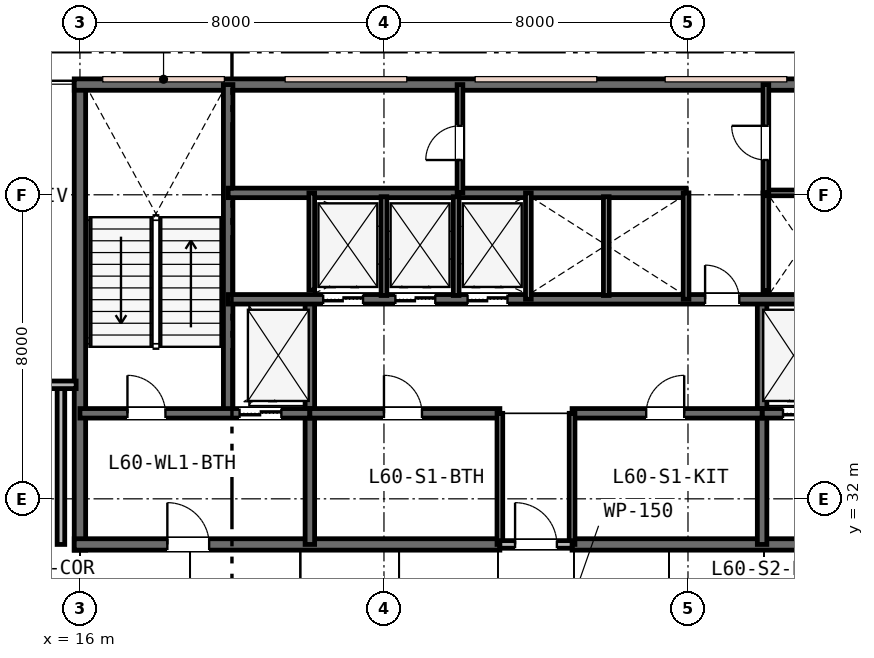
"""IFC4 building model, lengths in metres.
Left out: names, types, materials, properties, quantities, classifications, styles, units other than length and angle.
Written with IfcOpenShell. Run it as: python <this file> out.ifc"""

import sys

from ifc_helpers import new_model, si_unit, direction, frame, frame_2d, origin, place, context, subcontext, project, spatial, rectangle, extrude, element, fill, save


model = new_model("IFC4")
c1 = context("Model", 3, precision=1e-05, world=origin(), true_north=direction((0.0, 1.0)))
c2 = subcontext(c1, "Body", "Model", "MODEL_VIEW")
j1 = project(units=[si_unit("LENGTHUNIT", "METRE"), si_unit("PLANEANGLEUNIT", "RADIAN")], contexts=[c1])
p1 = place(None, origin())
s1 = spatial("IfcSite", under=j1, at=p1, CompositionType="ELEMENT")
p2 = place(p1, origin())
s2 = spatial("IfcBuilding", under=s1, at=p2, CompositionType="ELEMENT")
p3 = place(p2, frame((0.0, 0.0, 233.6)))
s3 = spatial("IfcBuildingStorey", under=s2, at=p3, CompositionType="ELEMENT", Elevation=233.6)
p4 = place(p3, frame((16.0, 30.65, 0.0), z_axis=(0.0, 0.0, 1.0), x_axis=(0.0, 1.0, 0.0)))
e1 = element("IfcWall", 1, at=p4, inside=s3, PredefinedType="SHEAR", context=c2, shape_type="SweptSolid", body=[
    extrude(rectangle(XDim=12.3, YDim=0.3, at=frame_2d((6.15, 0.0))), origin(), (0.0, 0.0, 1.0), 3.8),
])
p5 = place(p3, frame((15.85, 42.9, 0.0), z_axis=(0.0, 0.0, 1.0), x_axis=(1.0, 0.0, 0.0)))
e2 = element("IfcWall", 2, at=p5, inside=s3, PredefinedType="SHEAR", context=c2, shape_type="SweptSolid", body=[
    extrude(rectangle(XDim=24.3, YDim=0.3, at=frame_2d((12.15, 0.0))), origin(), (0.0, 0.0, 1.0), 3.8),
])
p6 = place(p3, frame((15.85, 30.8, 0.0), z_axis=(0.0, 0.0, 1.0), x_axis=(1.0, 0.0, 0.0)))
e3 = element("IfcWall", 3, at=p6, inside=s3, PredefinedType="SHEAR", context=c2, shape_type="SweptSolid", body=[
    extrude(rectangle(XDim=11.2, YDim=0.3, at=frame_2d((5.6, 0.0))), origin(), (0.0, 0.0, 1.0), 3.8),
])
p7 = place(p6, frame((2.45, 0.0, 0.0)))
e4 = element("IfcOpeningElement", 4, at=p7, cuts=e3, PredefinedType="OPENING", context=c2, shape_type="SweptSolid", body=[
    extrude(rectangle(XDim=1.1, YDim=2.15, at=frame_2d((0.55, 1.075))), frame((0.0, 0.16, 0.0), z_axis=(0.0, -1.0, 0.0), x_axis=(1.0, 0.0, 0.0)), (0.0, 0.0, 1.0), 0.32),
])
p8 = place(p3, frame((28.95, 30.8, 0.0), z_axis=(0.0, 0.0, 1.0), x_axis=(1.0, 0.0, 0.0)))
e5 = element("IfcWall", 5, at=p8, inside=s3, PredefinedType="SHEAR", context=c2, shape_type="SweptSolid", body=[
    extrude(rectangle(XDim=11.2, YDim=0.3, at=frame_2d((5.6, 0.0))), origin(), (0.0, 0.0, 1.0), 3.8),
])
p9 = place(p8, frame((7.65, 0.0, 0.0)))
e6 = element("IfcOpeningElement", 6, at=p9, cuts=e5, PredefinedType="OPENING", context=c2, shape_type="SweptSolid", body=[
    extrude(rectangle(XDim=1.1, YDim=2.15, at=frame_2d((0.55, 1.075))), frame((0.0, 0.16, 0.0), z_axis=(0.0, -1.0, 0.0), x_axis=(1.0, 0.0, 0.0)), (0.0, 0.0, 1.0), 0.32),
])
p10 = place(p3, frame((19.9, 34.25, 0.0), z_axis=(0.0, 0.0, 1.0), x_axis=(0.0, 1.0, 0.0)))
e7 = element("IfcWall", 7, at=p10, inside=s3, PredefinedType="SHEAR", context=c2, shape_type="SweptSolid", body=[
    extrude(rectangle(XDim=8.65, YDim=0.25, at=frame_2d((4.325, 0.0))), origin(), (0.0, 0.0, 1.0), 3.8),
])
for number, where, z_axis, x_axis in (
    (8, (22.05, 30.8, 0.0), (0.0, 0.0, 1.0), (0.0, 1.0, 0.0)),
    (9, (33.95, 30.8, 0.0), (0.0, 0.0, 1.0), (0.0, 1.0, 0.0)),
):
    element("IfcWall", number, at=place(p3, frame(where, z_axis=z_axis, x_axis=x_axis)), inside=s3, PredefinedType="SHEAR", context=c2, shape_type="SweptSolid", body=[
        extrude(rectangle(XDim=6.45, YDim=0.25, at=frame_2d((3.225, 0.0))), origin(), (0.0, 0.0, 1.0), 3.8),
    ])
p11 = place(p3, frame((16.0, 34.25, 0.0), z_axis=(0.0, 0.0, 1.0), x_axis=(1.0, 0.0, 0.0)))
e10 = element("IfcWall", 10, at=p11, inside=s3, PredefinedType="SHEAR", context=c2, shape_type="SweptSolid", body=[
    extrude(rectangle(XDim=6.05, YDim=0.25, at=frame_2d((3.025, 0.0))), origin(), (0.0, 0.0, 1.0), 3.8),
])
p12 = place(p11, frame((1.25, 0.0, 0.0)))
e11 = element("IfcOpeningElement", 11, at=p12, cuts=e10, PredefinedType="OPENING", context=c2, shape_type="SweptSolid", body=[
    extrude(rectangle(XDim=1.0, YDim=2.15, at=frame_2d((0.5, 1.075))), frame((0.0, 0.135, 0.0), z_axis=(0.0, -1.0, 0.0), x_axis=(1.0, 0.0, 0.0)), (0.0, 0.0, 1.0), 0.27),
])
p13 = place(p11, frame((4.2, 0.0, 0.0)))
e12 = element("IfcOpeningElement", 12, at=p13, cuts=e10, PredefinedType="OPENING", context=c2, shape_type="SweptSolid", body=[
    extrude(rectangle(XDim=1.1, YDim=2.15, at=frame_2d((0.55, 1.075))), frame((0.0, 0.135, 0.0), z_axis=(0.0, -1.0, 0.0), x_axis=(1.0, 0.0, 0.0)), (0.0, 0.0, 1.0), 0.27),
])
p14 = place(p3, frame((33.95, 34.25, 0.0), z_axis=(0.0, 0.0, 1.0), x_axis=(1.0, 0.0, 0.0)))
e13 = element("IfcWall", 13, at=p14, inside=s3, PredefinedType="SHEAR", context=c2, shape_type="SweptSolid", body=[
    extrude(rectangle(XDim=6.05, YDim=0.25, at=frame_2d((3.025, 0.0))), origin(), (0.0, 0.0, 1.0), 3.8),
])
p15 = place(p14, frame((3.7, 0.0, 0.0)))
e14 = element("IfcOpeningElement", 14, at=p15, cuts=e13, PredefinedType="OPENING", context=c2, shape_type="SweptSolid", body=[
    extrude(rectangle(XDim=1.0, YDim=2.15, at=frame_2d((0.5, 1.075))), frame((0.0, 0.135, 0.0), z_axis=(0.0, -1.0, 0.0), x_axis=(1.0, 0.0, 0.0)), (0.0, 0.0, 1.0), 0.27),
])
p16 = place(p14, frame((0.55, 0.0, 0.0)))
e15 = element("IfcOpeningElement", 15, at=p16, cuts=e13, PredefinedType="OPENING", context=c2, shape_type="SweptSolid", body=[
    extrude(rectangle(XDim=1.1, YDim=2.15, at=frame_2d((0.55, 1.075))), frame((0.0, 0.135, 0.0), z_axis=(0.0, -1.0, 0.0), x_axis=(1.0, 0.0, 0.0)), (0.0, 0.0, 1.0), 0.27),
])
p17 = place(p3, frame((22.05, 34.25, 0.0), z_axis=(0.0, 0.0, 1.0), x_axis=(1.0, 0.0, 0.0)))
e16 = element("IfcWall", 16, at=p17, inside=s3, PredefinedType="SHEAR", context=c2, shape_type="SweptSolid", body=[
    extrude(rectangle(XDim=5.0, YDim=0.25, at=frame_2d((2.5, 0.0))), origin(), (0.0, 0.0, 1.0), 3.8),
])
p18 = place(p17, frame((1.95, 0.0, 0.0)))
e17 = element("IfcOpeningElement", 17, at=p18, cuts=e16, PredefinedType="OPENING", context=c2, shape_type="SweptSolid", body=[
    extrude(rectangle(XDim=1.0, YDim=2.15, at=frame_2d((0.5, 1.075))), frame((0.0, 0.135, 0.0), z_axis=(0.0, -1.0, 0.0), x_axis=(1.0, 0.0, 0.0)), (0.0, 0.0, 1.0), 0.27),
])
p19 = place(p3, frame((28.95, 34.25, 0.0), z_axis=(0.0, 0.0, 1.0), x_axis=(1.0, 0.0, 0.0)))
e18 = element("IfcWall", 18, at=p19, inside=s3, PredefinedType="SHEAR", context=c2, shape_type="SweptSolid", body=[
    extrude(rectangle(XDim=5.0, YDim=0.25, at=frame_2d((2.5, 0.0))), origin(), (0.0, 0.0, 1.0), 3.8),
])
p20 = place(p19, frame((1.95, 0.0, 0.0)))
e19 = element("IfcOpeningElement", 19, at=p20, cuts=e18, PredefinedType="OPENING", context=c2, shape_type="SweptSolid", body=[
    extrude(rectangle(XDim=1.0, YDim=2.15, at=frame_2d((0.5, 1.075))), frame((0.0, 0.135, 0.0), z_axis=(0.0, -1.0, 0.0), x_axis=(1.0, 0.0, 0.0)), (0.0, 0.0, 1.0), 0.27),
])
p21 = place(p3, frame((19.9, 37.25, 0.0), z_axis=(0.0, 0.0, 1.0), x_axis=(1.0, 0.0, 0.0)))
e20 = element("IfcWall", 20, at=p21, inside=s3, PredefinedType="SHEAR", context=c2, shape_type="SweptSolid", body=[
    extrude(rectangle(XDim=16.2, YDim=0.25, at=frame_2d((8.1, 0.0))), origin(), (0.0, 0.0, 1.0), 3.8),
])
p22 = place(p21, frame((12.55, 0.0, 0.0)))
e21 = element("IfcOpeningElement", 21, at=p22, cuts=e20, PredefinedType="OPENING", context=c2, shape_type="SweptSolid", body=[
    extrude(rectangle(XDim=0.9, YDim=2.15, at=frame_2d((0.45, 1.075))), frame((0.0, 0.135, 0.0), z_axis=(0.0, -1.0, 0.0), x_axis=(1.0, 0.0, 0.0)), (0.0, 0.0, 1.0), 0.27),
])
p23 = place(p21, frame((2.5, 0.0, 0.0)))
e22 = element("IfcOpeningElement", 22, at=p23, cuts=e20, PredefinedType="OPENING", context=c2, shape_type="SweptSolid", body=[
    extrude(rectangle(XDim=1.05, YDim=2.15, at=frame_2d((0.525, 1.075))), frame((0.0, 0.135, 0.0), z_axis=(0.0, -1.0, 0.0), x_axis=(1.0, 0.0, 0.0)), (0.0, 0.0, 1.0), 0.27),
])
p24 = place(p21, frame((4.4, 0.0, 0.0)))
e23 = element("IfcOpeningElement", 23, at=p24, cuts=e20, PredefinedType="OPENING", context=c2, shape_type="SweptSolid", body=[
    extrude(rectangle(XDim=1.05, YDim=2.15, at=frame_2d((0.525, 1.075))), frame((0.0, 0.135, 0.0), z_axis=(0.0, -1.0, 0.0), x_axis=(1.0, 0.0, 0.0)), (0.0, 0.0, 1.0), 0.27),
])
p25 = place(p21, frame((6.3, 0.0, 0.0)))
e24 = element("IfcOpeningElement", 24, at=p25, cuts=e20, PredefinedType="OPENING", context=c2, shape_type="SweptSolid", body=[
    extrude(rectangle(XDim=1.05, YDim=2.15, at=frame_2d((0.525, 1.075))), frame((0.0, 0.135, 0.0), z_axis=(0.0, -1.0, 0.0), x_axis=(1.0, 0.0, 0.0)), (0.0, 0.0, 1.0), 0.27),
])
p26 = place(p3, frame((19.9, 40.05, 0.0), z_axis=(0.0, 0.0, 1.0), x_axis=(1.0, 0.0, 0.0)))
e25 = element("IfcWall", 25, at=p26, inside=s3, PredefinedType="SHEAR", context=c2, shape_type="SweptSolid", body=[
    extrude(rectangle(XDim=12.05, YDim=0.25, at=frame_2d((6.025, 0.0))), origin(), (0.0, 0.0, 1.0), 3.8),
])
for number, where, z_axis, x_axis in (
    (26, (27.05, 30.8, 0.0), (0.0, 0.0, 1.0), (0.0, 1.0, 0.0)),
    (27, (28.95, 30.8, 0.0), (0.0, 0.0, 1.0), (0.0, 1.0, 0.0)),
):
    element("IfcWall", number, at=place(p3, frame(where, z_axis=z_axis, x_axis=x_axis)), inside=s3, PredefinedType="PLUMBINGWALL", context=c2, shape_type="SweptSolid", body=[
        extrude(rectangle(XDim=3.45, YDim=0.15, at=frame_2d((1.725, 0.0))), origin(), (0.0, 0.0, 1.0), 3.22),
    ])
p27 = place(p3, frame((27.05, 30.8, 0.0), z_axis=(0.0, 0.0, 1.0), x_axis=(1.0, 0.0, 0.0)))
e28 = element("IfcWall", 28, at=p27, inside=s3, PredefinedType="PARTITIONING", context=c2, shape_type="SweptSolid", body=[
    extrude(rectangle(XDim=1.9, YDim=0.2, at=frame_2d((0.95, 0.0))), origin(), (0.0, 0.0, 1.0), 3.22),
])
p28 = place(p27, frame((0.4, 0.0, 0.0)))
e29 = element("IfcOpeningElement", 29, at=p28, cuts=e28, PredefinedType="OPENING", context=c2, shape_type="SweptSolid", body=[
    extrude(rectangle(XDim=1.1, YDim=2.15, at=frame_2d((0.55, 1.075))), frame((0.0, 0.11, 0.0), z_axis=(0.0, -1.0, 0.0), x_axis=(1.0, 0.0, 0.0)), (0.0, 0.0, 1.0), 0.22),
])
p29 = place(p3, frame((22.1, 37.49, 0.0), z_axis=(0.0, 0.0, 1.0), x_axis=(0.0, 1.0, 0.0)))
e30 = element("IfcWall", 30, at=p29, inside=s3, PredefinedType="PLUMBINGWALL", context=c2, shape_type="SweptSolid", body=[
    extrude(rectangle(XDim=2.56, YDim=0.15, at=frame_2d((1.28, 0.0))), origin(), (0.0, 0.0, 1.0), 3.53),
])
p30 = place(p3, frame((27.8, 37.25, 0.0), z_axis=(0.0, 0.0, 1.0), x_axis=(0.0, 1.0, 0.0)))
e31 = element("IfcWall", 31, at=p30, inside=s3, PredefinedType="PLUMBINGWALL", context=c2, shape_type="SweptSolid", body=[
    extrude(rectangle(XDim=2.8, YDim=0.15, at=frame_2d((1.4, 0.0))), origin(), (0.0, 0.0, 1.0), 3.53),
])
for number, where, z_axis, x_axis in (
    (32, (24.0, 37.35, 0.0), (0.0, 0.0, 1.0), (0.0, 1.0, 0.0)),
    (33, (25.9, 37.35, 0.0), (0.0, 0.0, 1.0), (0.0, 1.0, 0.0)),
):
    element("IfcWall", number, at=place(p3, frame(where, z_axis=z_axis, x_axis=x_axis)), inside=s3, PredefinedType="PLUMBINGWALL", context=c2, shape_type="SweptSolid", body=[
        extrude(rectangle(XDim=2.6, YDim=0.15, at=frame_2d((1.3, 0.0))), origin(), (0.0, 0.0, 1.0), 3.53),
    ])
p31 = place(p3, frame((31.95, 37.25, 0.0), z_axis=(0.0, 0.0, 1.0), x_axis=(0.0, 1.0, 0.0)))
e34 = element("IfcWall", 34, at=p31, inside=s3, PredefinedType="PLUMBINGWALL", context=c2, shape_type="SweptSolid", body=[
    extrude(rectangle(XDim=2.8, YDim=0.15, at=frame_2d((1.4, 0.0))), origin(), (0.0, 0.0, 1.0), 3.53),
])
p32 = place(p3, frame((29.85, 37.35, 0.0), z_axis=(0.0, 0.0, 1.0), x_axis=(0.0, 1.0, 0.0)))
e35 = element("IfcWall", 35, at=p32, inside=s3, PredefinedType="PLUMBINGWALL", context=c2, shape_type="SweptSolid", body=[
    extrude(rectangle(XDim=2.6, YDim=0.15, at=frame_2d((1.3, 0.0))), origin(), (0.0, 0.0, 1.0), 3.53),
])
p33 = place(p3, frame((34.05, 37.473, 0.0), z_axis=(0.0, 0.0, 1.0), x_axis=(0.0, 1.0, 0.0)))
e36 = element("IfcWall", 36, at=p33, inside=s3, PredefinedType="PLUMBINGWALL", context=c2, shape_type="SweptSolid", body=[
    extrude(rectangle(XDim=2.577, YDim=0.15, at=frame_2d((1.288, 0.0))), origin(), (0.0, 0.0, 1.0), 3.53),
])
p34 = place(p3, frame((34.05, 40.05, 0.0), z_axis=(0.0, 0.0, 1.0), x_axis=(1.0, 0.0, 0.0)))
e37 = element("IfcWall", 37, at=p34, inside=s3, PredefinedType="PARTITIONING", context=c2, shape_type="SweptSolid", body=[
    extrude(rectangle(XDim=2.05, YDim=0.15, at=frame_2d((1.025, 0.0))), origin(), (0.0, 0.0, 1.0), 3.53),
])
p35 = place(p3, frame((34.05, 40.05, 0.0), z_axis=(0.0, 0.0, 1.0), x_axis=(0.0, 1.0, 0.0)))
e38 = element("IfcWall", 38, at=p35, inside=s3, PredefinedType="PARTITIONING", context=c2, shape_type="SweptSolid", body=[
    extrude(rectangle(XDim=2.85, YDim=0.15, at=frame_2d((1.425, 0.0))), origin(), (0.0, 0.0, 1.0), 3.53),
])
p36 = place(p35, frame((0.865, 0.0, 0.0)))
e39 = element("IfcOpeningElement", 39, at=p36, cuts=e38, PredefinedType="OPENING", context=c2, shape_type="SweptSolid", body=[
    extrude(rectangle(XDim=0.9, YDim=2.15, at=frame_2d((0.45, 1.075))), frame((0.0, 0.085, 0.0), z_axis=(0.0, -1.0, 0.0), x_axis=(1.0, 0.0, 0.0)), (0.0, 0.0, 1.0), 0.17),
])
p37 = place(p3, frame((26.0, 40.05, 0.0), z_axis=(0.0, 0.0, 1.0), x_axis=(0.0, 1.0, 0.0)))
e40 = element("IfcWall", 40, at=p37, inside=s3, PredefinedType="PARTITIONING", context=c2, shape_type="SweptSolid", body=[
    extrude(rectangle(XDim=2.85, YDim=0.15, at=frame_2d((1.425, 0.0))), origin(), (0.0, 0.0, 1.0), 3.53),
])
p38 = place(p37, frame((0.865, 0.0, 0.0)))
e41 = element("IfcOpeningElement", 41, at=p38, cuts=e40, PredefinedType="OPENING", context=c2, shape_type="SweptSolid", body=[
    extrude(rectangle(XDim=0.9, YDim=2.15, at=frame_2d((0.45, 1.075))), frame((0.0, 0.085, 0.0), z_axis=(0.0, -1.0, 0.0), x_axis=(1.0, 0.0, 0.0)), (0.0, 0.0, 1.0), 0.17),
])
p39 = place(p3, frame((15.5, 30.8, 0.0), z_axis=(0.0, 0.0, 1.0), x_axis=(0.0, 1.0, 0.0)))
e42 = element("IfcWall", 42, at=p39, inside=s3, PredefinedType="PARTITIONING", context=c2, shape_type="SweptSolid", body=[
    extrude(rectangle(XDim=4.2, YDim=0.2, at=frame_2d((2.1, 0.0))), origin(), (0.0, 0.0, 1.0), 2.92),
])
p40 = place(p3, frame((5.1, 35.0, 0.0), z_axis=(0.0, 0.0, 1.0), x_axis=(1.0, 0.0, 0.0)))
e43 = element("IfcWall", 43, at=p40, inside=s3, PredefinedType="PARTITIONING", context=c2, shape_type="SweptSolid", body=[
    extrude(rectangle(XDim=10.8, YDim=0.2, at=frame_2d((5.4, 0.0))), origin(), (0.0, 0.0, 1.0), 3.24),
])
p41 = place(p40, frame((6.964, 0.0, 0.0)))
e44 = element("IfcOpeningElement", 44, at=p41, cuts=e43, PredefinedType="OPENING", context=c2, shape_type="SweptSolid", body=[
    extrude(rectangle(XDim=0.95, YDim=2.15, at=frame_2d((0.475, 1.075))), frame((0.0, 0.11, 0.0), z_axis=(0.0, -1.0, 0.0), x_axis=(1.0, 0.0, 0.0)), (0.0, 0.0, 1.0), 0.22),
])
p42 = place(p28, origin())
e45 = element("IfcDoor", 45, at=p42, inside=s3, OperationType="SINGLE_SWING_LEFT", PredefinedType="DOOR", context=c2, shape_type="SweptSolid", body=[
    extrude(rectangle(XDim=1.1, YDim=2.15, at=frame_2d((0.55, 1.075))), frame((0.0, 0.025, 0.0), z_axis=(0.0, -1.0, 0.0), x_axis=(1.0, 0.0, 0.0)), (0.0, 0.0, 1.0), 0.05),
])
fill(e29, e45)
p43 = place(p12, origin())
e46 = element("IfcDoor", 46, at=p43, inside=s3, OperationType="SINGLE_SWING_LEFT", PredefinedType="DOOR", context=c2, shape_type="SweptSolid", body=[
    extrude(rectangle(XDim=1.0, YDim=2.15, at=frame_2d((0.5, 1.075))), frame((0.0, 0.025, 0.0), z_axis=(0.0, -1.0, 0.0), x_axis=(1.0, 0.0, 0.0)), (0.0, 0.0, 1.0), 0.05),
])
fill(e11, e46)
p44 = place(p7, origin())
e47 = element("IfcDoor", 47, at=p44, inside=s3, OperationType="SINGLE_SWING_LEFT", PredefinedType="DOOR", context=c2, shape_type="SweptSolid", body=[
    extrude(rectangle(XDim=1.1, YDim=2.15, at=frame_2d((0.55, 1.075))), frame((0.0, 0.025, 0.0), z_axis=(0.0, -1.0, 0.0), x_axis=(1.0, 0.0, 0.0)), (0.0, 0.0, 1.0), 0.05),
])
fill(e4, e47)
p45 = place(p18, origin())
e48 = element("IfcDoor", 48, at=p45, inside=s3, OperationType="SINGLE_SWING_LEFT", PredefinedType="DOOR", context=c2, shape_type="SweptSolid", body=[
    extrude(rectangle(XDim=1.0, YDim=2.15, at=frame_2d((0.5, 1.075))), frame((0.0, 0.025, 0.0), z_axis=(0.0, -1.0, 0.0), x_axis=(1.0, 0.0, 0.0)), (0.0, 0.0, 1.0), 0.05),
])
fill(e17, e48)
p46 = place(p20, origin())
e49 = element("IfcDoor", 49, at=p46, inside=s3, OperationType="SINGLE_SWING_RIGHT", PredefinedType="DOOR", context=c2, shape_type="SweptSolid", body=[
    extrude(rectangle(XDim=1.0, YDim=2.15, at=frame_2d((0.5, 1.075))), frame((0.0, 0.025, 0.0), z_axis=(0.0, -1.0, 0.0), x_axis=(1.0, 0.0, 0.0)), (0.0, 0.0, 1.0), 0.05),
])
fill(e19, e49)
p47 = place(p22, origin())
e50 = element("IfcDoor", 50, at=p47, inside=s3, OperationType="SINGLE_SWING_LEFT", PredefinedType="DOOR", context=c2, shape_type="SweptSolid", body=[
    extrude(rectangle(XDim=0.9, YDim=2.15, at=frame_2d((0.45, 1.075))), frame((0.0, 0.025, 0.0), z_axis=(0.0, -1.0, 0.0), x_axis=(1.0, 0.0, 0.0)), (0.0, 0.0, 1.0), 0.05),
])
fill(e21, e50)
p48 = place(p36, origin())
e51 = element("IfcDoor", 51, at=p48, inside=s3, OperationType="SINGLE_SWING_RIGHT", PredefinedType="DOOR", context=c2, shape_type="SweptSolid", body=[
    extrude(rectangle(XDim=0.9, YDim=2.15, at=frame_2d((0.45, 1.075))), frame((0.0, 0.025, 0.0), z_axis=(0.0, -1.0, 0.0), x_axis=(1.0, 0.0, 0.0)), (0.0, 0.0, 1.0), 0.05),
])
fill(e39, e51)
p49 = place(p38, origin())
e52 = element("IfcDoor", 52, at=p49, inside=s3, OperationType="SINGLE_SWING_LEFT", PredefinedType="DOOR", context=c2, shape_type="SweptSolid", body=[
    extrude(rectangle(XDim=0.9, YDim=2.15, at=frame_2d((0.45, 1.075))), frame((0.0, 0.025, 0.0), z_axis=(0.0, -1.0, 0.0), x_axis=(1.0, 0.0, 0.0)), (0.0, 0.0, 1.0), 0.05),
])
fill(e41, e52)
p50 = place(p13, origin())
e53 = element("IfcDoor", 53, at=p50, inside=s3, OperationType="DOUBLE_DOOR_SLIDING", PredefinedType="DOOR", context=c2, shape_type="SweptSolid", body=[
    extrude(rectangle(XDim=1.1, YDim=2.15, at=frame_2d((0.55, 1.075))), frame((0.0, 0.025, 0.0), z_axis=(0.0, -1.0, 0.0), x_axis=(1.0, 0.0, 0.0)), (0.0, 0.0, 1.0), 0.05),
])
fill(e12, e53)
p51 = place(p16, origin())
e54 = element("IfcDoor", 54, at=p51, inside=s3, OperationType="DOUBLE_DOOR_SLIDING", PredefinedType="DOOR", context=c2, shape_type="SweptSolid", body=[
    extrude(rectangle(XDim=1.1, YDim=2.15, at=frame_2d((0.55, 1.075))), frame((0.0, 0.025, 0.0), z_axis=(0.0, -1.0, 0.0), x_axis=(1.0, 0.0, 0.0)), (0.0, 0.0, 1.0), 0.05),
])
fill(e15, e54)
p52 = place(p23, origin())
e55 = element("IfcDoor", 55, at=p52, inside=s3, OperationType="DOUBLE_DOOR_SLIDING", PredefinedType="DOOR", context=c2, shape_type="SweptSolid", body=[
    extrude(rectangle(XDim=1.05, YDim=2.15, at=frame_2d((0.525, 1.075))), frame((0.0, 0.025, 0.0), z_axis=(0.0, -1.0, 0.0), x_axis=(1.0, 0.0, 0.0)), (0.0, 0.0, 1.0), 0.05),
])
fill(e22, e55)
p53 = place(p24, origin())
e56 = element("IfcDoor", 56, at=p53, inside=s3, OperationType="DOUBLE_DOOR_SLIDING", PredefinedType="DOOR", context=c2, shape_type="SweptSolid", body=[
    extrude(rectangle(XDim=1.05, YDim=2.15, at=frame_2d((0.525, 1.075))), frame((0.0, 0.025, 0.0), z_axis=(0.0, -1.0, 0.0), x_axis=(1.0, 0.0, 0.0)), (0.0, 0.0, 1.0), 0.05),
])
fill(e23, e56)
p54 = place(p25, origin())
e57 = element("IfcDoor", 57, at=p54, inside=s3, OperationType="DOUBLE_DOOR_SLIDING", PredefinedType="DOOR", context=c2, shape_type="SweptSolid", body=[
    extrude(rectangle(XDim=1.05, YDim=2.15, at=frame_2d((0.525, 1.075))), frame((0.0, 0.025, 0.0), z_axis=(0.0, -1.0, 0.0), x_axis=(1.0, 0.0, 0.0)), (0.0, 0.0, 1.0), 0.05),
])
fill(e24, e57)
save(model, sys.argv[1])
